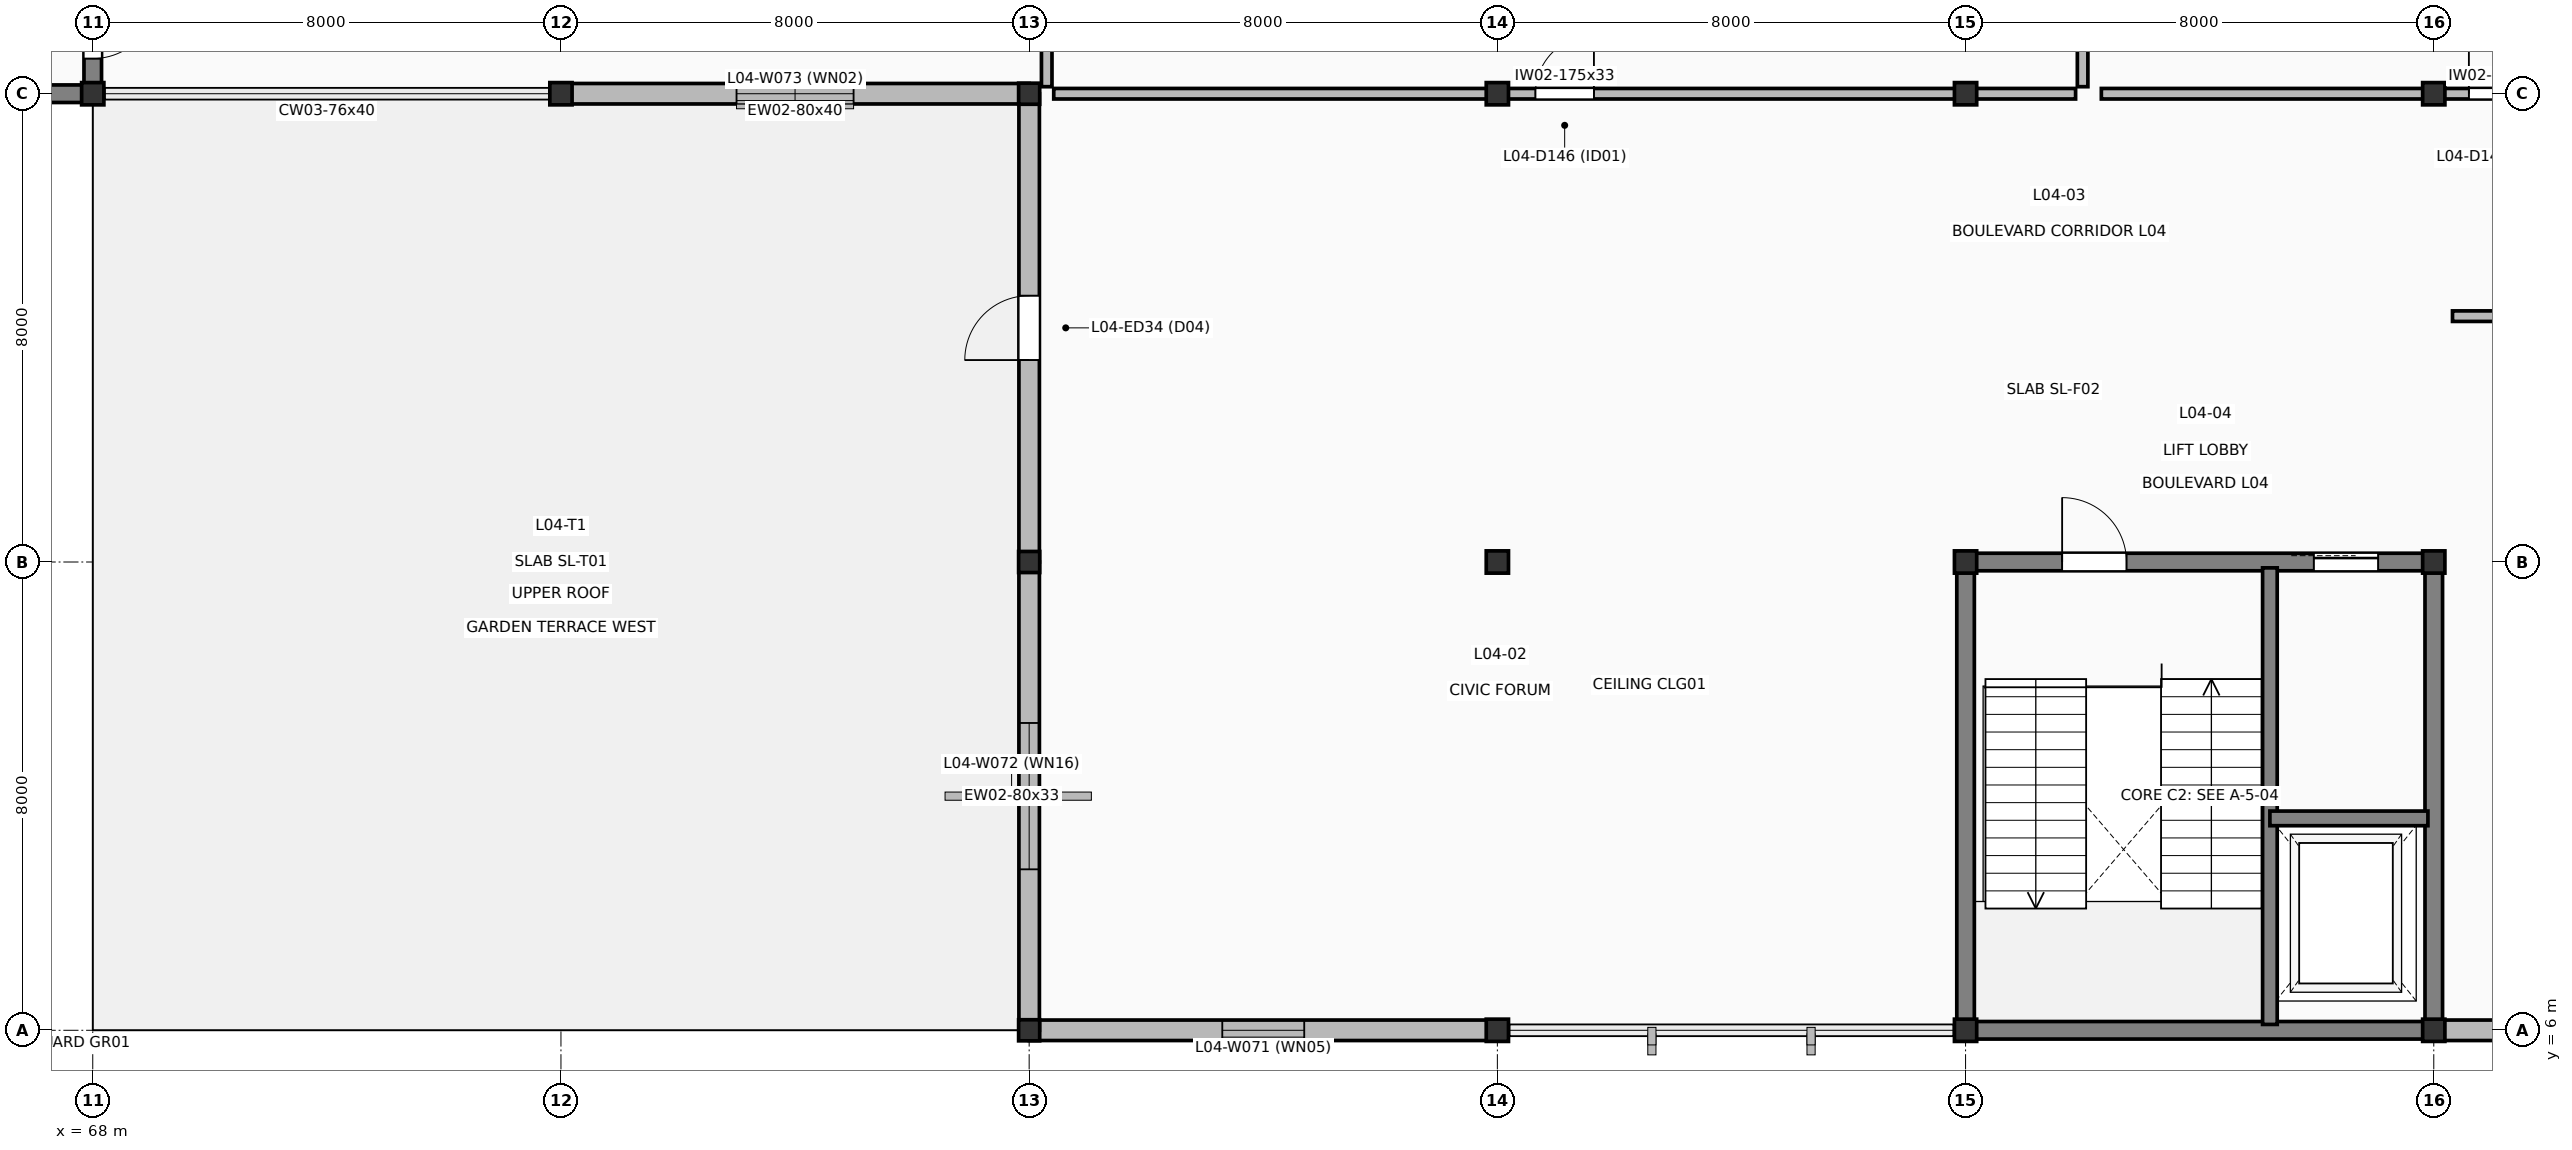
"""IFC4 building model, lengths in metres.
Left out: names, types, materials, properties, quantities, classifications, styles, units other than length and angle.
Written with IfcOpenShell. Run it as: python <this file> out.ifc"""

import sys

from ifc_helpers import new_model, si_unit, direction, frame, frame_2d, origin, origin_2d, place, context, subcontext, project, spatial, rectangle, extrude, element, fill, save


model = new_model("IFC4")
c1 = context("Model", 3, precision=1e-05, world=origin(), true_north=direction((0.0, 1.0)))
c2 = subcontext(c1, "Body", "Model", "MODEL_VIEW")
j1 = project(units=[si_unit("LENGTHUNIT", "METRE"), si_unit("PLANEANGLEUNIT", "RADIAN")], contexts=[c1])
p1 = place(None, origin())
s1 = spatial("IfcSite", under=j1, at=p1, CompositionType="ELEMENT")
p2 = place(p1, origin())
s2 = spatial("IfcBuilding", under=s1, at=p2, CompositionType="ELEMENT")
p3 = place(p2, frame((0.0, 0.0, 18.0)))
s3 = spatial("IfcBuildingStorey", under=s2, at=p3, CompositionType="ELEMENT", Elevation=18.0)
for number, where, z_axis, x_axis in (
    (1, (68.0, 22.0, 0.0), (0.0, 0.0, 1.0), (1.0, 0.0, 0.0)),
    (2, (76.0, 22.0, 0.0), (0.0, 0.0, 1.0), (1.0, 0.0, 0.0)),
):
    element("IfcColumn", number, at=place(p3, frame(where, z_axis=z_axis, x_axis=x_axis)), inside=s3, PredefinedType="COLUMN", context=c2, shape_type="SweptSolid", body=[
        extrude(rectangle(XDim=0.38, YDim=0.38, at=origin_2d()), origin(), (0.0, 0.0, 1.0), 4.2),
    ])
for number, where, z_axis, x_axis in (
    (3, (84.0, 6.0, 0.0), (0.0, 0.0, 1.0), (1.0, 0.0, 0.0)),
    (4, (84.0, 14.0, 0.0), (0.0, 0.0, 1.0), (1.0, 0.0, 0.0)),
    (5, (84.0, 22.0, 0.0), (0.0, 0.0, 1.0), (1.0, 0.0, 0.0)),
):
    element("IfcColumn", number, at=place(p3, frame(where, z_axis=z_axis, x_axis=x_axis)), inside=s3, PredefinedType="COLUMN", context=c2, shape_type="SweptSolid", body=[
        extrude(rectangle(XDim=0.36, YDim=0.36, at=origin_2d()), origin(), (0.0, 0.0, 1.0), 4.2),
    ])
for number, where, z_axis, x_axis in (
    (6, (92.0, 6.0, 0.0), (0.0, 0.0, 1.0), (1.0, 0.0, 0.0)),
    (7, (92.0, 14.0, 0.0), (0.0, 0.0, 1.0), (1.0, 0.0, 0.0)),
    (8, (92.0, 22.0, 0.0), (0.0, 0.0, 1.0), (1.0, 0.0, 0.0)),
    (9, (100.0, 6.0, 0.0), (0.0, 0.0, 1.0), (1.0, 0.0, 0.0)),
    (10, (100.0, 14.0, 0.0), (0.0, 0.0, 1.0), (1.0, 0.0, 0.0)),
    (11, (100.0, 22.0, 0.0), (0.0, 0.0, 1.0), (1.0, 0.0, 0.0)),
    (12, (108.0, 6.0, 0.0), (0.0, 0.0, 1.0), (1.0, 0.0, 0.0)),
    (13, (108.0, 14.0, 0.0), (0.0, 0.0, 1.0), (1.0, 0.0, 0.0)),
    (14, (108.0, 22.0, 0.0), (0.0, 0.0, 1.0), (1.0, 0.0, 0.0)),
):
    element("IfcColumn", number, at=place(p3, frame(where, z_axis=z_axis, x_axis=x_axis)), inside=s3, PredefinedType="COLUMN", context=c2, shape_type="SweptSolid", body=[
        extrude(rectangle(XDim=0.38, YDim=0.38, at=origin_2d()), origin(), (0.0, 0.0, 1.0), 4.2),
    ])
p4 = place(p3, frame((116.0, 6.0, 0.0), z_axis=(0.0, 0.0, 1.0), x_axis=(-1.0, 0.0, 0.0)))
e15 = element("IfcWall", 15, at=p4, inside=s3, PredefinedType="SOLIDWALL", context=c2, shape_type="SweptSolid", body=[
    extrude(rectangle(XDim=8.0, YDim=0.35, at=frame_2d((4.0, 0.0))), origin(), (0.0, 0.0, 1.0), 3.465),
])
p5 = place(p4, frame((3.0, 0.0, 0.9)))
e16 = element("IfcOpeningElement", 16, at=p5, cuts=e15, PredefinedType="OPENING", context=c2, shape_type="SweptSolid", body=[
    extrude(rectangle(XDim=2.0, YDim=2.2, at=frame_2d((1.0, 1.1))), frame((0.0, 0.185, 0.0), z_axis=(0.0, -1.0, 0.0), x_axis=(1.0, 0.0, 0.0)), (0.0, 0.0, 1.0), 0.37),
])
p6 = place(p3, frame((108.0, 6.0, 0.0), z_axis=(0.0, 0.0, 1.0), x_axis=(-1.0, 0.0, 0.0)))
e17 = element("IfcWall", 17, at=p6, inside=s3, PredefinedType="SOLIDWALL", context=c2, shape_type="SweptSolid", body=[
    extrude(rectangle(XDim=8.0, YDim=0.3, at=frame_2d((4.0, 0.0))), origin(), (0.0, 0.0, 1.0), 4.2),
])
p7 = place(p3, frame((92.0, 6.0, 0.0), z_axis=(0.0, 0.0, 1.0), x_axis=(-1.0, 0.0, 0.0)))
e18 = element("IfcWall", 18, at=p7, inside=s3, PredefinedType="SOLIDWALL", context=c2, shape_type="SweptSolid", body=[
    extrude(rectangle(XDim=8.0, YDim=0.35, at=frame_2d((4.0, 0.0))), origin(), (0.0, 0.0, 1.0), 3.465),
])
p8 = place(p7, frame((3.3, 0.0, 0.95)))
e19 = element("IfcOpeningElement", 19, at=p8, cuts=e18, PredefinedType="OPENING", context=c2, shape_type="SweptSolid", body=[
    extrude(rectangle(XDim=1.4, YDim=1.8, at=frame_2d((0.7, 0.9))), frame((0.0, 0.185, 0.0), z_axis=(0.0, -1.0, 0.0), x_axis=(1.0, 0.0, 0.0)), (0.0, 0.0, 1.0), 0.37),
])
p9 = place(p3, frame((84.0, 6.0, 0.0), z_axis=(0.0, 0.0, 1.0), x_axis=(0.0, 1.0, 0.0)))
e20 = element("IfcWall", 20, at=p9, inside=s3, PredefinedType="SOLIDWALL", context=c2, shape_type="SweptSolid", body=[
    extrude(rectangle(XDim=8.0, YDim=0.35, at=frame_2d((4.0, 0.0))), origin(), (0.0, 0.0, 1.0), 3.345),
])
p10 = place(p9, frame((2.75, 0.0, 1.6)))
e21 = element("IfcOpeningElement", 21, at=p10, cuts=e20, PredefinedType="OPENING", context=c2, shape_type="SweptSolid", body=[
    extrude(rectangle(XDim=2.5, YDim=1.3, at=frame_2d((1.25, 0.65))), frame((0.0, 0.185, 0.0), z_axis=(0.0, -1.0, 0.0), x_axis=(1.0, 0.0, 0.0)), (0.0, 0.0, 1.0), 0.37),
])
p11 = place(p3, frame((84.0, 14.0, 0.0), z_axis=(0.0, 0.0, 1.0), x_axis=(0.0, 1.0, 0.0)))
e22 = element("IfcWall", 22, at=p11, inside=s3, PredefinedType="SOLIDWALL", context=c2, shape_type="SweptSolid", body=[
    extrude(rectangle(XDim=8.0, YDim=0.35, at=frame_2d((4.0, 0.0))), origin(), (0.0, 0.0, 1.0), 3.345),
])
p12 = place(p11, frame((3.45, 0.0, 0.0)))
e23 = element("IfcOpeningElement", 23, at=p12, cuts=e22, PredefinedType="OPENING", context=c2, shape_type="SweptSolid", body=[
    extrude(rectangle(XDim=1.1, YDim=2.2, at=frame_2d((0.55, 1.1))), frame((0.0, 0.185, 0.0), z_axis=(0.0, -1.0, 0.0), x_axis=(1.0, 0.0, 0.0)), (0.0, 0.0, 1.0), 0.37),
])
p13 = place(p3, frame((84.0, 22.0, 0.0), z_axis=(0.0, 0.0, 1.0), x_axis=(-1.0, 0.0, 0.0)))
e24 = element("IfcWall", 24, at=p13, inside=s3, PredefinedType="SOLIDWALL", context=c2, shape_type="SweptSolid", body=[
    extrude(rectangle(XDim=8.0, YDim=0.35, at=frame_2d((4.0, 0.0))), origin(), (0.0, 0.0, 1.0), 4.0),
])
p14 = place(p13, frame((3.0, 0.0, 0.9)))
e25 = element("IfcOpeningElement", 25, at=p14, cuts=e24, PredefinedType="OPENING", context=c2, shape_type="SweptSolid", body=[
    extrude(rectangle(XDim=2.0, YDim=2.2, at=frame_2d((1.0, 1.1))), frame((0.0, 0.185, 0.0), z_axis=(0.0, -1.0, 0.0), x_axis=(1.0, 0.0, 0.0)), (0.0, 0.0, 1.0), 0.37),
])
p15 = place(p3, frame((68.0, 22.0, 0.0), z_axis=(0.0, 0.0, 1.0), x_axis=(-1.0, 0.0, 0.0)))
e26 = element("IfcWall", 26, at=p15, inside=s3, PredefinedType="SHEAR", context=c2, shape_type="SweptSolid", body=[
    extrude(rectangle(XDim=8.0, YDim=0.3, at=frame_2d((4.0, 0.0))), origin(), (0.0, 0.0, 1.0), 4.2),
])
p16 = place(p3, frame((68.0, 30.0, 0.0), z_axis=(0.0, 0.0, 1.0), x_axis=(0.0, -1.0, 0.0)))
e27 = element("IfcWall", 27, at=p16, inside=s3, PredefinedType="SHEAR", context=c2, shape_type="SweptSolid", body=[
    extrude(rectangle(XDim=8.0, YDim=0.3, at=frame_2d((4.0, 0.0))), origin(), (0.0, 0.0, 1.0), 4.2),
])
p17 = place(p16, frame((6.3, 0.0, 0.0)))
e28 = element("IfcOpeningElement", 28, at=p17, cuts=e27, PredefinedType="OPENING", context=c2, shape_type="SweptSolid", body=[
    extrude(rectangle(XDim=1.1, YDim=2.2, at=frame_2d((0.55, 1.1))), frame((0.0, 0.16, 0.0), z_axis=(0.0, -1.0, 0.0), x_axis=(1.0, 0.0, 0.0)), (0.0, 0.0, 1.0), 0.32),
])
p18 = place(p16, frame((2.15, 0.0, 0.0)))
e29 = element("IfcOpeningElement", 29, at=p18, cuts=e27, PredefinedType="OPENING", context=c2, shape_type="SweptSolid", body=[
    extrude(rectangle(XDim=1.1, YDim=2.2, at=frame_2d((0.55, 1.1))), frame((0.0, 0.16, 0.0), z_axis=(0.0, -1.0, 0.0), x_axis=(1.0, 0.0, 0.0)), (0.0, 0.0, 1.0), 0.32),
])
p19 = place(p3, frame((100.0, 6.0, 0.0), z_axis=(0.0, 0.0, 1.0), x_axis=(0.0, 1.0, 0.0)))
e30 = element("IfcWall", 30, at=p19, inside=s3, PredefinedType="SHEAR", context=c2, shape_type="SweptSolid", body=[
    extrude(rectangle(XDim=8.0, YDim=0.3, at=frame_2d((4.0, 0.0))), origin(), (0.0, 0.0, 1.0), 4.2),
])
p20 = place(p3, frame((100.0, 14.0, 0.0), z_axis=(0.0, 0.0, 1.0), x_axis=(1.0, 0.0, 0.0)))
e31 = element("IfcWall", 31, at=p20, inside=s3, PredefinedType="SHEAR", context=c2, shape_type="SweptSolid", body=[
    extrude(rectangle(XDim=8.0, YDim=0.3, at=frame_2d((4.0, 0.0))), origin(), (0.0, 0.0, 1.0), 4.2),
])
p21 = place(p20, frame((1.65, 0.0, 0.0)))
e32 = element("IfcOpeningElement", 32, at=p21, cuts=e31, PredefinedType="OPENING", context=c2, shape_type="SweptSolid", body=[
    extrude(rectangle(XDim=1.1, YDim=2.2, at=frame_2d((0.55, 1.1))), frame((0.0, 0.16, 0.0), z_axis=(0.0, -1.0, 0.0), x_axis=(1.0, 0.0, 0.0)), (0.0, 0.0, 1.0), 0.32),
])
p22 = place(p20, frame((5.95, 0.0, 0.0)))
e33 = element("IfcOpeningElement", 33, at=p22, cuts=e31, PredefinedType="OPENING", context=c2, shape_type="SweptSolid", body=[
    extrude(rectangle(XDim=1.1, YDim=2.2, at=frame_2d((0.55, 1.1))), frame((0.0, 0.16, 0.0), z_axis=(0.0, -1.0, 0.0), x_axis=(1.0, 0.0, 0.0)), (0.0, 0.0, 1.0), 0.32),
])
p23 = place(p3, frame((108.0, 14.0, 0.0), z_axis=(0.0, 0.0, 1.0), x_axis=(0.0, -1.0, 0.0)))
e34 = element("IfcWall", 34, at=p23, inside=s3, PredefinedType="SHEAR", context=c2, shape_type="SweptSolid", body=[
    extrude(rectangle(XDim=8.0, YDim=0.3, at=frame_2d((4.0, 0.0))), origin(), (0.0, 0.0, 1.0), 4.2),
])
p24 = place(p3, frame((105.2, 6.1, 0.0), z_axis=(0.0, 0.0, 1.0), x_axis=(0.0, 1.0, 0.0)))
e35 = element("IfcWall", 35, at=p24, inside=s3, PredefinedType="SHEAR", context=c2, shape_type="SweptSolid", body=[
    extrude(rectangle(XDim=7.8, YDim=0.25, at=frame_2d((3.9, 0.0))), origin(), (0.0, 0.0, 1.0), 4.2),
])
p25 = place(p3, frame((105.2, 9.62, 0.0), z_axis=(0.0, 0.0, 1.0), x_axis=(1.0, 0.0, 0.0)))
e36 = element("IfcWall", 36, at=p25, inside=s3, PredefinedType="SHEAR", context=c2, shape_type="SweptSolid", body=[
    extrude(rectangle(XDim=2.7, YDim=0.25, at=frame_2d((1.35, 0.0))), origin(), (0.0, 0.0, 1.0), 4.2),
])
p26 = place(p3, frame((119.88, 18.2, 0.0), z_axis=(0.0, 0.0, 1.0), x_axis=(-1.0, 0.0, 0.0)))
e37 = element("IfcWall", 37, at=p26, inside=s3, PredefinedType="PARTITIONING", context=c2, shape_type="SweptSolid", body=[
    extrude(rectangle(XDim=11.56, YDim=0.18, at=frame_2d((5.78, 0.0))), origin(), (0.0, 0.0, 1.0), 3.905),
])
p27 = place(p26, frame((5.28, 0.0, 0.0)))
e38 = element("IfcOpeningElement", 38, at=p27, cuts=e37, PredefinedType="OPENING", context=c2, shape_type="SweptSolid", body=[
    extrude(rectangle(XDim=1.0, YDim=2.15, at=frame_2d((0.5, 1.075))), frame((0.0, 0.1, 0.0), z_axis=(0.0, -1.0, 0.0), x_axis=(1.0, 0.0, 0.0)), (0.0, 0.0, 1.0), 0.2),
])
p28 = place(p3, frame((84.42, 22.0, 0.0), z_axis=(0.0, 0.0, 1.0), x_axis=(1.0, 0.0, 0.0)))
e39 = element("IfcWall", 39, at=p28, inside=s3, PredefinedType="PARTITIONING", context=c2, shape_type="SweptSolid", body=[
    extrude(rectangle(XDim=17.46, YDim=0.18, at=frame_2d((8.73, 0.0))), origin(), (0.0, 0.0, 1.0), 3.285),
])
p29 = place(p28, frame((8.23, 0.0, 0.0)))
e40 = element("IfcOpeningElement", 40, at=p29, cuts=e39, PredefinedType="OPENING", context=c2, shape_type="SweptSolid", body=[
    extrude(rectangle(XDim=1.0, YDim=2.15, at=frame_2d((0.5, 1.075))), frame((0.0, 0.1, 0.0), z_axis=(0.0, -1.0, 0.0), x_axis=(1.0, 0.0, 0.0)), (0.0, 0.0, 1.0), 0.2),
])
for number, where, z_axis, x_axis in (
    (41, (84.3, 29.58, 0.0), (0.0, 0.0, 1.0), (0.0, -1.0, 0.0)),
    (42, (102.0, 22.12, 0.0), (0.0, 0.0, 1.0), (0.0, 1.0, 0.0)),
):
    element("IfcWall", number, at=place(p3, frame(where, z_axis=z_axis, x_axis=x_axis)), inside=s3, PredefinedType="PARTITIONING", context=c2, shape_type="SweptSolid", body=[
        extrude(rectangle(XDim=7.46, YDim=0.18, at=frame_2d((3.73, 0.0))), origin(), (0.0, 0.0, 1.0), 4.0),
    ])
p30 = place(p3, frame((102.32, 22.0, 0.0), z_axis=(0.0, 0.0, 1.0), x_axis=(1.0, 0.0, 0.0)))
e43 = element("IfcWall", 43, at=p30, inside=s3, PredefinedType="PARTITIONING", context=c2, shape_type="SweptSolid", body=[
    extrude(rectangle(XDim=13.56, YDim=0.18, at=frame_2d((6.78, 0.0))), origin(), (0.0, 0.0, 1.0), 3.285),
])
p31 = place(p30, frame((6.28, 0.0, 0.0)))
e44 = element("IfcOpeningElement", 44, at=p31, cuts=e43, PredefinedType="OPENING", context=c2, shape_type="SweptSolid", body=[
    extrude(rectangle(XDim=1.0, YDim=2.15, at=frame_2d((0.5, 1.075))), frame((0.0, 0.1, 0.0), z_axis=(0.0, -1.0, 0.0), x_axis=(1.0, 0.0, 0.0)), (0.0, 0.0, 1.0), 0.2),
])
p32 = place(p8, origin())
e45 = element("IfcWindow", 45, at=p32, inside=s3, PartitioningType="SINGLE_PANEL", PredefinedType="WINDOW", context=c2, shape_type="SweptSolid", body=[
    extrude(rectangle(XDim=1.4, YDim=1.8, at=frame_2d((0.7, 0.9))), frame((0.0, 0.03, 0.0), z_axis=(0.0, -1.0, 0.0), x_axis=(1.0, 0.0, 0.0)), (0.0, 0.0, 1.0), 0.06),
])
fill(e19, e45)
p33 = place(p10, origin())
e46 = element("IfcWindow", 46, at=p33, inside=s3, PartitioningType="DOUBLE_PANEL_VERTICAL", PredefinedType="WINDOW", context=c2, shape_type="SweptSolid", body=[
    extrude(rectangle(XDim=2.5, YDim=1.3, at=frame_2d((1.25, 0.65))), frame((0.0, 0.03, 0.0), z_axis=(0.0, -1.0, 0.0), x_axis=(1.0, 0.0, 0.0)), (0.0, 0.0, 1.0), 0.06),
])
fill(e21, e46)
p34 = place(p12, origin())
e47 = element("IfcDoor", 47, at=p34, inside=s3, OperationType="SINGLE_SWING_LEFT", PredefinedType="DOOR", context=c2, shape_type="SweptSolid", body=[
    extrude(rectangle(XDim=1.1, YDim=2.2, at=frame_2d((0.55, 1.1))), frame((0.0, 0.025, 0.0), z_axis=(0.0, -1.0, 0.0), x_axis=(1.0, 0.0, 0.0)), (0.0, 0.0, 1.0), 0.05),
])
fill(e23, e47)
p35 = place(p14, origin())
e48 = element("IfcWindow", 48, at=p35, inside=s3, PartitioningType="DOUBLE_PANEL_VERTICAL", PredefinedType="WINDOW", context=c2, shape_type="SweptSolid", body=[
    extrude(rectangle(XDim=2.0, YDim=2.2, at=frame_2d((1.0, 1.1))), frame((0.0, 0.03, 0.0), z_axis=(0.0, -1.0, 0.0), x_axis=(1.0, 0.0, 0.0)), (0.0, 0.0, 1.0), 0.06),
])
fill(e25, e48)
p36 = place(p17, origin())
e49 = element("IfcDoor", 49, at=p36, inside=s3, OperationType="SINGLE_SWING_LEFT", PredefinedType="DOOR", context=c2, shape_type="SweptSolid", body=[
    extrude(rectangle(XDim=1.1, YDim=2.2, at=frame_2d((0.55, 1.1))), frame((0.0, 0.025, 0.0), z_axis=(0.0, -1.0, 0.0), x_axis=(1.0, 0.0, 0.0)), (0.0, 0.0, 1.0), 0.05),
])
fill(e28, e49)
p37 = place(p21, origin())
e50 = element("IfcDoor", 50, at=p37, inside=s3, OperationType="SINGLE_SWING_LEFT", PredefinedType="DOOR", context=c2, shape_type="SweptSolid", body=[
    extrude(rectangle(XDim=1.1, YDim=2.2, at=frame_2d((0.55, 1.1))), frame((0.0, 0.025, 0.0), z_axis=(0.0, -1.0, 0.0), x_axis=(1.0, 0.0, 0.0)), (0.0, 0.0, 1.0), 0.05),
])
fill(e32, e50)
p38 = place(p22, origin())
e51 = element("IfcDoor", 51, at=p38, inside=s3, OperationType="SLIDING_TO_LEFT", PredefinedType="DOOR", context=c2, shape_type="SweptSolid", body=[
    extrude(rectangle(XDim=1.1, YDim=2.2, at=frame_2d((0.55, 1.1))), frame((0.0, 0.025, 0.0), z_axis=(0.0, -1.0, 0.0), x_axis=(1.0, 0.0, 0.0)), (0.0, 0.0, 1.0), 0.05),
])
fill(e33, e51)
p39 = place(p29, origin())
e52 = element("IfcDoor", 52, at=p39, inside=s3, OperationType="SINGLE_SWING_RIGHT", PredefinedType="DOOR", context=c2, shape_type="SweptSolid", body=[
    extrude(rectangle(XDim=1.0, YDim=2.15, at=frame_2d((0.5, 1.075))), frame((0.0, 0.025, 0.0), z_axis=(0.0, -1.0, 0.0), x_axis=(1.0, 0.0, 0.0)), (0.0, 0.0, 1.0), 0.05),
])
fill(e40, e52)
p40 = place(p31, origin())
e53 = element("IfcDoor", 53, at=p40, inside=s3, OperationType="SINGLE_SWING_LEFT", PredefinedType="DOOR", context=c2, shape_type="SweptSolid", body=[
    extrude(rectangle(XDim=1.0, YDim=2.15, at=frame_2d((0.5, 1.075))), frame((0.0, 0.025, 0.0), z_axis=(0.0, -1.0, 0.0), x_axis=(1.0, 0.0, 0.0)), (0.0, 0.0, 1.0), 0.05),
])
fill(e44, e53)
save(model, sys.argv[1])
